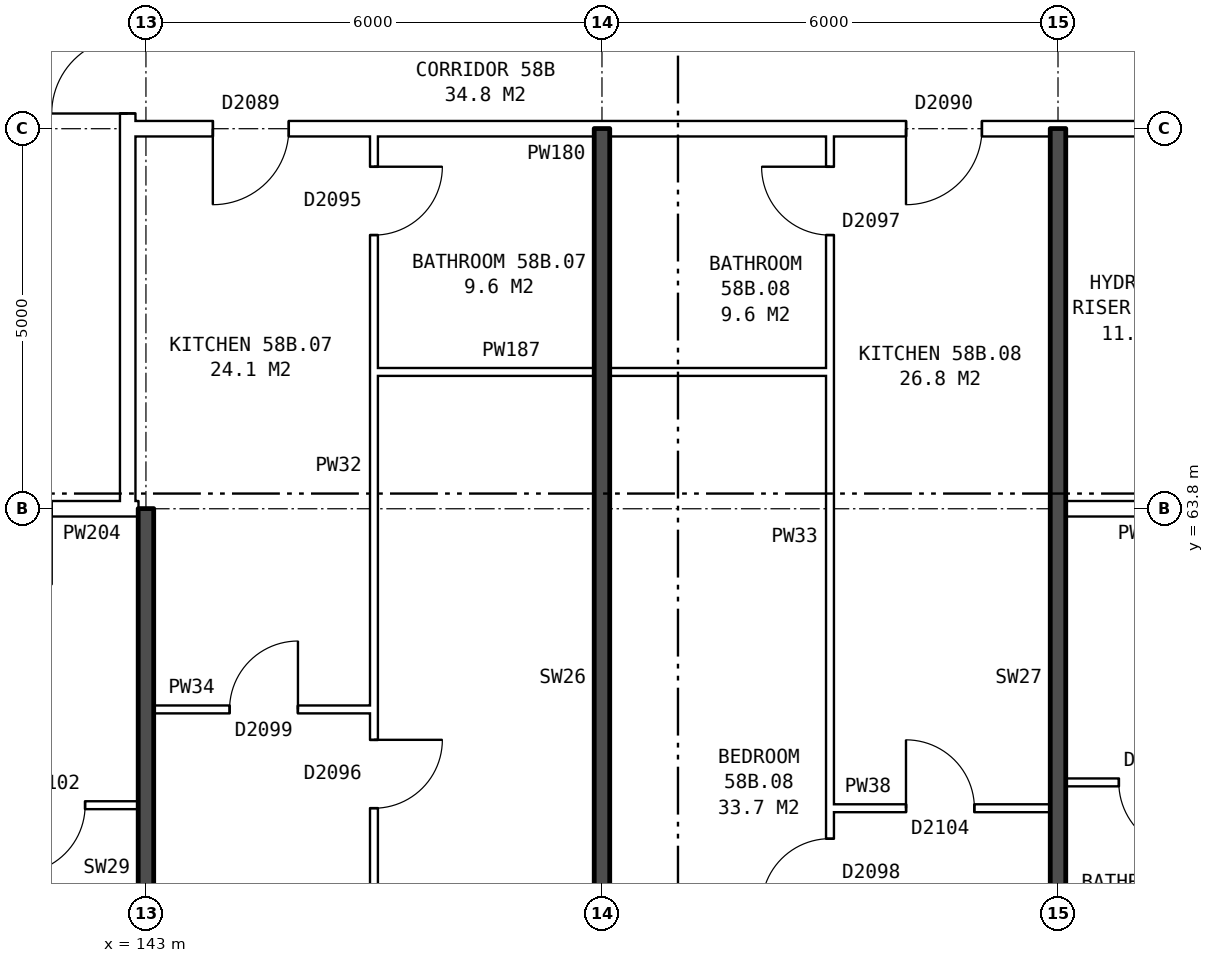
"""IFC4 building model, lengths in metres.
Left out: names, types, materials, properties, quantities, classifications, styles, units other than length and angle.
Written with IfcOpenShell. Run it as: python <this file> out.ifc"""

import sys

from ifc_helpers import new_model, si_unit, direction, frame, frame_2d, origin, place, context, subcontext, project, spatial, rectangle, extrude, element, fill, save


model = new_model("IFC4")
c1 = context("Model", 3, precision=1e-05, world=origin(), true_north=direction((0.0, 1.0)))
c2 = subcontext(c1, "Body", "Model", "MODEL_VIEW")
j1 = project(units=[si_unit("LENGTHUNIT", "METRE"), si_unit("PLANEANGLEUNIT", "RADIAN")], contexts=[c1])
p1 = place(None, origin())
s1 = spatial("IfcSite", under=j1, at=p1, CompositionType="ELEMENT")
p2 = place(p1, origin())
s2 = spatial("IfcBuilding", under=s1, at=p2, CompositionType="ELEMENT")
p3 = place(p2, frame((0.0, 0.0, 205.9)))
s3 = spatial("IfcBuildingStorey", under=s2, at=p3, CompositionType="ELEMENT", Elevation=205.9)
p4 = place(p3, frame((142.76, 63.9, 0.0), z_axis=(0.0, 0.0, 1.0), x_axis=(0.0, 1.0, 0.0)))
e1 = element("IfcWall", 1, at=p4, inside=s3, PredefinedType="PARTITIONING", context=c2, shape_type="SweptSolid", body=[
    extrude(rectangle(XDim=12.2, YDim=0.2, at=frame_2d((6.1, 0.0))), origin(), (0.0, 0.0, 1.0), 2.85),
])
p5 = place(p4, frame((5.1, 0.0, 0.0)))
e2 = element("IfcOpeningElement", 2, at=p5, cuts=e1, PredefinedType="OPENING", context=c2, shape_type="SweptSolid", body=[
    extrude(rectangle(XDim=2.0, YDim=2.1, at=frame_2d((1.0, 1.05))), frame((0.0, 0.11, 0.0), z_axis=(0.0, -1.0, 0.0), x_axis=(1.0, 0.0, 0.0)), (0.0, 0.0, 1.0), 0.22),
])
p6 = place(p3, frame((152.0, 59.86, 0.0), z_axis=(0.0, 0.0, 1.0), x_axis=(1.0, 0.0, 0.0)))
e3 = element("IfcWall", 3, at=p6, inside=s3, PredefinedType="PARTITIONING", context=c2, shape_type="SweptSolid", body=[
    extrude(rectangle(XDim=2.9, YDim=0.1, at=frame_2d((1.45, 0.0))), origin(), (0.0, 0.0, 1.0), 2.85),
])
p7 = place(p6, frame((1.0, 0.0, 0.0)))
e4 = element("IfcOpeningElement", 4, at=p7, cuts=e3, PredefinedType="OPENING", context=c2, shape_type="SweptSolid", body=[
    extrude(rectangle(XDim=0.9, YDim=2.1, at=frame_2d((0.45, 1.05))), frame((0.0, 0.06, 0.0), z_axis=(0.0, -1.0, 0.0), x_axis=(1.0, 0.0, 0.0)), (0.0, 0.0, 1.0), 0.12),
])
p8 = place(p3, frame((137.1, 59.9, 0.0), z_axis=(0.0, 0.0, 1.0), x_axis=(1.0, 0.0, 0.0)))
e5 = element("IfcWall", 5, at=p8, inside=s3, PredefinedType="PARTITIONING", context=c2, shape_type="SweptSolid", body=[
    extrude(rectangle(XDim=5.8, YDim=0.1, at=frame_2d((2.9, 0.0))), origin(), (0.0, 0.0, 1.0), 2.85),
])
p9 = place(p8, frame((1.3, 0.0, 0.0)))
e6 = element("IfcOpeningElement", 6, at=p9, cuts=e5, PredefinedType="OPENING", context=c2, shape_type="SweptSolid", body=[
    extrude(rectangle(XDim=0.9, YDim=2.1, at=frame_2d((0.45, 1.05))), frame((0.0, 0.06, 0.0), z_axis=(0.0, -1.0, 0.0), x_axis=(1.0, 0.0, 0.0)), (0.0, 0.0, 1.0), 0.12),
])
p10 = place(p8, frame((4.2, 0.0, 0.0)))
e7 = element("IfcOpeningElement", 7, at=p10, cuts=e5, PredefinedType="OPENING", context=c2, shape_type="SweptSolid", body=[
    extrude(rectangle(XDim=0.9, YDim=2.1, at=frame_2d((0.45, 1.05))), frame((0.0, 0.06, 0.0), z_axis=(0.0, -1.0, 0.0), x_axis=(1.0, 0.0, 0.0)), (0.0, 0.0, 1.0), 0.12),
])
p11 = place(p3, frame((155.1, 60.2, 0.0), z_axis=(0.0, 0.0, 1.0), x_axis=(1.0, 0.0, 0.0)))
e8 = element("IfcWall", 8, at=p11, inside=s3, PredefinedType="PARTITIONING", context=c2, shape_type="SweptSolid", body=[
    extrude(rectangle(XDim=5.8, YDim=0.1, at=frame_2d((2.9, 0.0))), origin(), (0.0, 0.0, 1.0), 2.85),
])
p12 = place(p11, frame((3.6, 0.0, 0.0)))
e9 = element("IfcOpeningElement", 9, at=p12, cuts=e8, PredefinedType="OPENING", context=c2, shape_type="SweptSolid", body=[
    extrude(rectangle(XDim=0.9, YDim=2.1, at=frame_2d((0.45, 1.05))), frame((0.0, 0.06, 0.0), z_axis=(0.0, -1.0, 0.0), x_axis=(1.0, 0.0, 0.0)), (0.0, 0.0, 1.0), 0.12),
])
p13 = place(p11, frame((0.7, 0.0, 0.0)))
e10 = element("IfcOpeningElement", 10, at=p13, cuts=e8, PredefinedType="OPENING", context=c2, shape_type="SweptSolid", body=[
    extrude(rectangle(XDim=0.9, YDim=2.1, at=frame_2d((0.45, 1.05))), frame((0.0, 0.06, 0.0), z_axis=(0.0, -1.0, 0.0), x_axis=(1.0, 0.0, 0.0)), (0.0, 0.0, 1.0), 0.12),
])
p14 = place(p3, frame((143.1, 61.16, 0.0), z_axis=(0.0, 0.0, 1.0), x_axis=(1.0, 0.0, 0.0)))
e11 = element("IfcWall", 11, at=p14, inside=s3, PredefinedType="PARTITIONING", context=c2, shape_type="SweptSolid", body=[
    extrude(rectangle(XDim=2.9, YDim=0.1, at=frame_2d((1.45, 0.0))), origin(), (0.0, 0.0, 1.0), 2.85),
])
p15 = place(p14, frame((1.0, 0.0, 0.0)))
e12 = element("IfcOpeningElement", 12, at=p15, cuts=e11, PredefinedType="OPENING", context=c2, shape_type="SweptSolid", body=[
    extrude(rectangle(XDim=0.9, YDim=2.1, at=frame_2d((0.45, 1.05))), frame((0.0, 0.06, 0.0), z_axis=(0.0, -1.0, 0.0), x_axis=(1.0, 0.0, 0.0)), (0.0, 0.0, 1.0), 0.12),
])
p16 = place(p3, frame((139.76, 63.8, 0.0), z_axis=(0.0, 0.0, 1.0), x_axis=(1.0, 0.0, 0.0)))
e13 = element("IfcWall", 13, at=p16, inside=s3, PredefinedType="PARTITIONING", context=c2, shape_type="SweptSolid", body=[
    extrude(rectangle(XDim=3.0, YDim=0.2, at=frame_2d((1.5, 0.0))), origin(), (0.0, 0.0, 1.0), 2.85),
])
p17 = place(p16, frame((1.0, 0.0, 0.0)))
e14 = element("IfcOpeningElement", 14, at=p17, cuts=e13, PredefinedType="OPENING", context=c2, shape_type="SweptSolid", body=[
    extrude(rectangle(XDim=1.0, YDim=2.1, at=frame_2d((0.5, 1.05))), frame((0.0, 0.11, 0.0), z_axis=(0.0, -1.0, 0.0), x_axis=(1.0, 0.0, 0.0)), (0.0, 0.0, 1.0), 0.22),
])
p18 = place(p3, frame((142.76, 63.8, 0.0), z_axis=(0.0, 0.0, 1.0), x_axis=(1.0, 0.0, 0.0)))
e15 = element("IfcWall", 15, at=p18, inside=s3, PredefinedType="PARTITIONING", context=c2, shape_type="SweptSolid", body=[
    extrude(rectangle(XDim=0.14, YDim=0.2, at=frame_2d((0.07, 0.0))), origin(), (0.0, 0.0, 1.0), 2.85),
])
p19 = place(p3, frame((155.1, 63.8, 0.0), z_axis=(0.0, 0.0, 1.0), x_axis=(1.0, 0.0, 0.0)))
e16 = element("IfcWall", 16, at=p19, inside=s3, PredefinedType="PARTITIONING", context=c2, shape_type="SweptSolid", body=[
    extrude(rectangle(XDim=2.14, YDim=0.2, at=frame_2d((1.07, 0.0))), origin(), (0.0, 0.0, 1.0), 2.85),
])
p20 = place(p3, frame((146.0, 65.6, 0.0), z_axis=(0.0, 0.0, 1.0), x_axis=(1.0, 0.0, 0.0)))
e17 = element("IfcWall", 17, at=p20, inside=s3, PredefinedType="PARTITIONING", context=c2, shape_type="SweptSolid", body=[
    extrude(rectangle(XDim=6.0, YDim=0.1, at=frame_2d((3.0, 0.0))), origin(), (0.0, 0.0, 1.0), 2.85),
])
p21 = place(p3, frame((142.76, 68.8, 0.0), z_axis=(0.0, 0.0, 1.0), x_axis=(1.0, 0.0, 0.0)))
e18 = element("IfcWall", 18, at=p21, inside=s3, PredefinedType="PARTITIONING", context=c2, shape_type="SweptSolid", body=[
    extrude(rectangle(XDim=14.48, YDim=0.2, at=frame_2d((7.24, 0.0))), origin(), (0.0, 0.0, 1.0), 2.85),
])
p22 = place(p21, frame((1.12, 0.0, 0.0)))
e19 = element("IfcOpeningElement", 19, at=p22, cuts=e18, PredefinedType="OPENING", context=c2, shape_type="SweptSolid", body=[
    extrude(rectangle(XDim=1.0, YDim=2.1, at=frame_2d((0.5, 1.05))), frame((0.0, 0.11, 0.0), z_axis=(0.0, -1.0, 0.0), x_axis=(1.0, 0.0, 0.0)), (0.0, 0.0, 1.0), 0.22),
])
p23 = place(p21, frame((10.24, 0.0, 0.0)))
e20 = element("IfcOpeningElement", 20, at=p23, cuts=e18, PredefinedType="OPENING", context=c2, shape_type="SweptSolid", body=[
    extrude(rectangle(XDim=1.0, YDim=2.1, at=frame_2d((0.5, 1.05))), frame((0.0, 0.11, 0.0), z_axis=(0.0, -1.0, 0.0), x_axis=(1.0, 0.0, 0.0)), (0.0, 0.0, 1.0), 0.22),
])
p24 = place(p3, frame((143.0, 54.36, 0.0), z_axis=(0.0, 0.0, 1.0), x_axis=(0.0, 1.0, 0.0)))
e21 = element("IfcWall", 21, at=p24, inside=s3, PredefinedType="SOLIDWALL", context=c2, shape_type="SweptSolid", body=[
    extrude(rectangle(XDim=9.44, YDim=0.2, at=frame_2d((4.72, 0.0))), origin(), (0.0, 0.0, 1.0), 2.85),
])
p25 = place(p3, frame((146.0, 54.36, 0.0), z_axis=(0.0, 0.0, 1.0), x_axis=(0.0, 1.0, 0.0)))
e22 = element("IfcWall", 22, at=p25, inside=s3, PredefinedType="PARTITIONING", context=c2, shape_type="SweptSolid", body=[
    extrude(rectangle(XDim=14.34, YDim=0.1, at=frame_2d((7.17, 0.0))), origin(), (0.0, 0.0, 1.0), 2.85),
])
p26 = place(p25, frame((5.5, 0.0, 0.0)))
e23 = element("IfcOpeningElement", 23, at=p26, cuts=e22, PredefinedType="OPENING", context=c2, shape_type="SweptSolid", body=[
    extrude(rectangle(XDim=0.9, YDim=2.1, at=frame_2d((0.45, 1.05))), frame((0.0, 0.06, 0.0), z_axis=(0.0, -1.0, 0.0), x_axis=(1.0, 0.0, 0.0)), (0.0, 0.0, 1.0), 0.12),
])
p27 = place(p25, frame((13.04, 0.0, 0.0)))
e24 = element("IfcOpeningElement", 24, at=p27, cuts=e22, PredefinedType="OPENING", context=c2, shape_type="SweptSolid", body=[
    extrude(rectangle(XDim=0.9, YDim=2.1, at=frame_2d((0.45, 1.05))), frame((0.0, 0.06, 0.0), z_axis=(0.0, -1.0, 0.0), x_axis=(1.0, 0.0, 0.0)), (0.0, 0.0, 1.0), 0.12),
])
p28 = place(p3, frame((149.0, 54.36, 0.0), z_axis=(0.0, 0.0, 1.0), x_axis=(0.0, 1.0, 0.0)))
e25 = element("IfcWall", 25, at=p28, inside=s3, PredefinedType="SOLIDWALL", context=c2, shape_type="SweptSolid", body=[
    extrude(rectangle(XDim=14.44, YDim=0.2, at=frame_2d((7.22, 0.0))), origin(), (0.0, 0.0, 1.0), 2.85),
])
p29 = place(p3, frame((152.0, 54.36, 0.0), z_axis=(0.0, 0.0, 1.0), x_axis=(0.0, 1.0, 0.0)))
e26 = element("IfcWall", 26, at=p29, inside=s3, PredefinedType="PARTITIONING", context=c2, shape_type="SweptSolid", body=[
    extrude(rectangle(XDim=14.34, YDim=0.1, at=frame_2d((7.17, 0.0))), origin(), (0.0, 0.0, 1.0), 2.85),
])
p30 = place(p29, frame((4.2, 0.0, 0.0)))
e27 = element("IfcOpeningElement", 27, at=p30, cuts=e26, PredefinedType="OPENING", context=c2, shape_type="SweptSolid", body=[
    extrude(rectangle(XDim=0.9, YDim=2.1, at=frame_2d((0.45, 1.05))), frame((0.0, 0.06, 0.0), z_axis=(0.0, -1.0, 0.0), x_axis=(1.0, 0.0, 0.0)), (0.0, 0.0, 1.0), 0.12),
])
p31 = place(p29, frame((13.04, 0.0, 0.0)))
e28 = element("IfcOpeningElement", 28, at=p31, cuts=e26, PredefinedType="OPENING", context=c2, shape_type="SweptSolid", body=[
    extrude(rectangle(XDim=0.9, YDim=2.1, at=frame_2d((0.45, 1.05))), frame((0.0, 0.06, 0.0), z_axis=(0.0, -1.0, 0.0), x_axis=(1.0, 0.0, 0.0)), (0.0, 0.0, 1.0), 0.12),
])
p32 = place(p3, frame((155.0, 54.36, 0.0), z_axis=(0.0, 0.0, 1.0), x_axis=(0.0, 1.0, 0.0)))
e29 = element("IfcWall", 29, at=p32, inside=s3, PredefinedType="SOLIDWALL", context=c2, shape_type="SweptSolid", body=[
    extrude(rectangle(XDim=14.44, YDim=0.2, at=frame_2d((7.22, 0.0))), origin(), (0.0, 0.0, 1.0), 2.85),
])
p33 = place(p5, origin())
e30 = element("IfcDoor", 30, at=p33, inside=s3, OperationType="DOUBLE_DOOR_SINGLE_SWING", PredefinedType="DOOR", context=c2, shape_type="SweptSolid", body=[
    extrude(rectangle(XDim=2.0, YDim=2.1, at=frame_2d((1.0, 1.05))), frame((0.0, 0.025, 0.0), z_axis=(0.0, -1.0, 0.0), x_axis=(1.0, 0.0, 0.0)), (0.0, 0.0, 1.0), 0.05),
])
fill(e2, e30)
p34 = place(p10, frame((0.9, 0.0, 0.0), z_axis=(0.0, 0.0, 1.0), x_axis=(-1.0, 0.0, 0.0)))
e31 = element("IfcDoor", 31, at=p34, inside=s3, OperationType="SINGLE_SWING_RIGHT", PredefinedType="DOOR", context=c2, shape_type="SweptSolid", body=[
    extrude(rectangle(XDim=0.9, YDim=2.1, at=frame_2d((0.45, 1.05))), frame((0.0, 0.025, 0.0), z_axis=(0.0, -1.0, 0.0), x_axis=(1.0, 0.0, 0.0)), (0.0, 0.0, 1.0), 0.05),
])
fill(e7, e31)
p35 = place(p13, frame((0.9, 0.0, 0.0), z_axis=(0.0, 0.0, 1.0), x_axis=(-1.0, 0.0, 0.0)))
e32 = element("IfcDoor", 32, at=p35, inside=s3, OperationType="SINGLE_SWING_LEFT", PredefinedType="DOOR", context=c2, shape_type="SweptSolid", body=[
    extrude(rectangle(XDim=0.9, YDim=2.1, at=frame_2d((0.45, 1.05))), frame((0.0, 0.025, 0.0), z_axis=(0.0, -1.0, 0.0), x_axis=(1.0, 0.0, 0.0)), (0.0, 0.0, 1.0), 0.05),
])
fill(e10, e32)
p36 = place(p26, frame((0.9, 0.0, 0.0), z_axis=(0.0, 0.0, 1.0), x_axis=(-1.0, 0.0, 0.0)))
e33 = element("IfcDoor", 33, at=p36, inside=s3, OperationType="SINGLE_SWING_LEFT", PredefinedType="DOOR", context=c2, shape_type="SweptSolid", body=[
    extrude(rectangle(XDim=0.9, YDim=2.1, at=frame_2d((0.45, 1.05))), frame((0.0, 0.025, 0.0), z_axis=(0.0, -1.0, 0.0), x_axis=(1.0, 0.0, 0.0)), (0.0, 0.0, 1.0), 0.05),
])
fill(e23, e33)
p37 = place(p22, frame((1.0, 0.0, 0.0), z_axis=(0.0, 0.0, 1.0), x_axis=(-1.0, 0.0, 0.0)))
e34 = element("IfcDoor", 34, at=p37, inside=s3, OperationType="SINGLE_SWING_RIGHT", PredefinedType="DOOR", context=c2, shape_type="SweptSolid", body=[
    extrude(rectangle(XDim=1.0, YDim=2.1, at=frame_2d((0.5, 1.05))), frame((0.0, 0.025, 0.0), z_axis=(0.0, -1.0, 0.0), x_axis=(1.0, 0.0, 0.0)), (0.0, 0.0, 1.0), 0.05),
])
fill(e19, e34)
p38 = place(p15, origin())
e35 = element("IfcDoor", 35, at=p38, inside=s3, OperationType="SINGLE_SWING_RIGHT", PredefinedType="DOOR", context=c2, shape_type="SweptSolid", body=[
    extrude(rectangle(XDim=0.9, YDim=2.1, at=frame_2d((0.45, 1.05))), frame((0.0, 0.025, 0.0), z_axis=(0.0, -1.0, 0.0), x_axis=(1.0, 0.0, 0.0)), (0.0, 0.0, 1.0), 0.05),
])
fill(e12, e35)
p39 = place(p27, frame((0.9, 0.0, 0.0), z_axis=(0.0, 0.0, 1.0), x_axis=(-1.0, 0.0, 0.0)))
e36 = element("IfcDoor", 36, at=p39, inside=s3, OperationType="SINGLE_SWING_LEFT", PredefinedType="DOOR", context=c2, shape_type="SweptSolid", body=[
    extrude(rectangle(XDim=0.9, YDim=2.1, at=frame_2d((0.45, 1.05))), frame((0.0, 0.025, 0.0), z_axis=(0.0, -1.0, 0.0), x_axis=(1.0, 0.0, 0.0)), (0.0, 0.0, 1.0), 0.05),
])
fill(e24, e36)
p40 = place(p30, origin())
e37 = element("IfcDoor", 37, at=p40, inside=s3, OperationType="SINGLE_SWING_LEFT", PredefinedType="DOOR", context=c2, shape_type="SweptSolid", body=[
    extrude(rectangle(XDim=0.9, YDim=2.1, at=frame_2d((0.45, 1.05))), frame((0.0, 0.025, 0.0), z_axis=(0.0, -1.0, 0.0), x_axis=(1.0, 0.0, 0.0)), (0.0, 0.0, 1.0), 0.05),
])
fill(e27, e37)
p41 = place(p23, frame((1.0, 0.0, 0.0), z_axis=(0.0, 0.0, 1.0), x_axis=(-1.0, 0.0, 0.0)))
e38 = element("IfcDoor", 38, at=p41, inside=s3, OperationType="SINGLE_SWING_RIGHT", PredefinedType="DOOR", context=c2, shape_type="SweptSolid", body=[
    extrude(rectangle(XDim=1.0, YDim=2.1, at=frame_2d((0.5, 1.05))), frame((0.0, 0.025, 0.0), z_axis=(0.0, -1.0, 0.0), x_axis=(1.0, 0.0, 0.0)), (0.0, 0.0, 1.0), 0.05),
])
fill(e20, e38)
p42 = place(p7, origin())
e39 = element("IfcDoor", 39, at=p42, inside=s3, OperationType="SINGLE_SWING_LEFT", PredefinedType="DOOR", context=c2, shape_type="SweptSolid", body=[
    extrude(rectangle(XDim=0.9, YDim=2.1, at=frame_2d((0.45, 1.05))), frame((0.0, 0.025, 0.0), z_axis=(0.0, -1.0, 0.0), x_axis=(1.0, 0.0, 0.0)), (0.0, 0.0, 1.0), 0.05),
])
fill(e4, e39)
p43 = place(p31, origin())
e40 = element("IfcDoor", 40, at=p43, inside=s3, OperationType="SINGLE_SWING_RIGHT", PredefinedType="DOOR", context=c2, shape_type="SweptSolid", body=[
    extrude(rectangle(XDim=0.9, YDim=2.1, at=frame_2d((0.45, 1.05))), frame((0.0, 0.025, 0.0), z_axis=(0.0, -1.0, 0.0), x_axis=(1.0, 0.0, 0.0)), (0.0, 0.0, 1.0), 0.05),
])
fill(e28, e40)
save(model, sys.argv[1])
